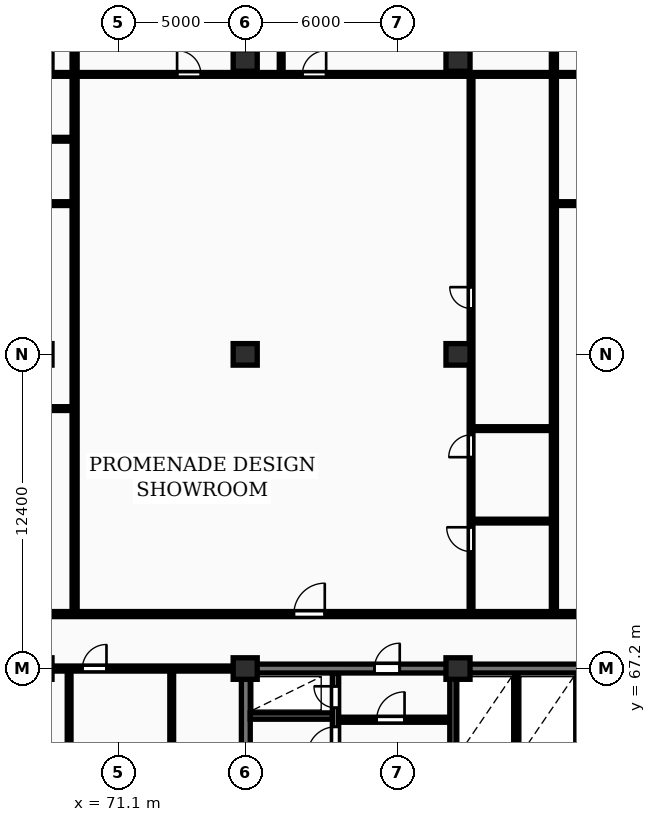
"""IFC4 building model, lengths in metres.
Left out: names, types, materials, properties, quantities, classifications, styles, units other than length and angle.
Written with IfcOpenShell. Run it as: python <this file> out.ifc"""

import sys

from ifc_helpers import new_model, si_unit, direction, frame, frame_2d, origin, origin_2d, place, context, subcontext, project, spatial, rectangle, extrude, element, fill, save


model = new_model("IFC4")
c1 = context("Model", 3, precision=1e-05, world=origin(), true_north=direction((0.0, 1.0)))
c2 = subcontext(c1, "Body", "Model", "MODEL_VIEW")
j1 = project(units=[si_unit("LENGTHUNIT", "METRE"), si_unit("PLANEANGLEUNIT", "RADIAN")], contexts=[c1])
p1 = place(None, origin())
s1 = spatial("IfcSite", under=j1, at=p1, CompositionType="ELEMENT")
p2 = place(p1, origin())
s2 = spatial("IfcBuilding", under=s1, at=p2, CompositionType="ELEMENT")
p3 = place(p2, frame((0.0, 0.0, 80.8)))
s3 = spatial("IfcBuildingStorey", under=s2, at=p3, CompositionType="ELEMENT", Elevation=80.8)
for number, where, z_axis, x_axis in (
    (1, (76.1, 67.2, 0.0), (0.0, 0.0, 1.0), (1.0, 0.0, 0.0)),
    (2, (76.1, 79.6, 0.0), (0.0, 0.0, 1.0), (1.0, 0.0, 0.0)),
    (3, (76.1, 91.2, 0.0), (0.0, 0.0, 1.0), (1.0, 0.0, 0.0)),
    (4, (84.5, 67.2, 0.0), (0.0, 0.0, 1.0), (1.0, 0.0, 0.0)),
    (5, (84.5, 79.6, 0.0), (0.0, 0.0, 1.0), (1.0, 0.0, 0.0)),
    (6, (84.5, 91.2, 0.0), (0.0, 0.0, 1.0), (1.0, 0.0, 0.0)),
):
    element("IfcColumn", number, at=place(p3, frame(where, z_axis=z_axis, x_axis=x_axis)), inside=s3, PredefinedType="COLUMN", context=c2, shape_type="SweptSolid", body=[
        extrude(rectangle(XDim=0.95, YDim=0.85, at=origin_2d()), origin(), (0.0, 0.0, 1.0), 3.25),
    ])
p4 = place(p3, frame((76.125, 55.375, 0.0), z_axis=(0.0, 0.0, 1.0), x_axis=(0.0, 1.0, 0.0)))
e7 = element("IfcWall", 7, at=p4, inside=s3, PredefinedType="SHEAR", context=c2, shape_type="SweptSolid", body=[
    extrude(rectangle(XDim=11.65, YDim=0.35, at=frame_2d((5.825, 0.0))), origin(), (0.0, 0.0, 1.0), 3.25),
])
p5 = place(p3, frame((75.95, 67.2, 0.0), z_axis=(0.0, 0.0, 1.0), x_axis=(1.0, 0.0, 0.0)))
e8 = element("IfcWall", 8, at=p5, inside=s3, PredefinedType="SHEAR", context=c2, shape_type="SweptSolid", body=[
    extrude(rectangle(XDim=36.3, YDim=0.35, at=frame_2d((18.15, 0.0))), origin(), (0.0, 0.0, 1.0), 3.25),
])
p6 = place(p5, frame((5.25, 0.0, 0.0)))
e9 = element("IfcOpeningElement", 9, at=p6, cuts=e8, PredefinedType="OPENING", context=c2, shape_type="SweptSolid", body=[
    extrude(rectangle(XDim=1.0, YDim=2.15, at=frame_2d((0.5, 1.075))), frame((0.0, 0.185, 0.0), z_axis=(0.0, -1.0, 0.0), x_axis=(1.0, 0.0, 0.0)), (0.0, 0.0, 1.0), 0.37),
])
p7 = place(p5, frame((21.6, 0.0, 0.0)))
e10 = element("IfcOpeningElement", 10, at=p7, cuts=e8, PredefinedType="OPENING", context=c2, shape_type="SweptSolid", body=[
    extrude(rectangle(XDim=1.5, YDim=2.2, at=frame_2d((0.75, 1.1))), frame((0.0, 0.185, 0.0), z_axis=(0.0, -1.0, 0.0), x_axis=(1.0, 0.0, 0.0)), (0.0, 0.0, 1.0), 0.37),
])
p8 = place(p5, frame((30.45, 0.0, 0.0)))
e11 = element("IfcOpeningElement", 11, at=p8, cuts=e8, PredefinedType="OPENING", context=c2, shape_type="SweptSolid", body=[
    extrude(rectangle(XDim=1.0, YDim=2.15, at=frame_2d((0.5, 1.075))), frame((0.0, 0.185, 0.0), z_axis=(0.0, -1.0, 0.0), x_axis=(1.0, 0.0, 0.0)), (0.0, 0.0, 1.0), 0.37),
])
p9 = place(p3, frame((79.665, 55.4, 0.0), z_axis=(0.0, 0.0, 1.0), x_axis=(0.0, 1.0, 0.0)))
e12 = element("IfcWall", 12, at=p9, inside=s3, PredefinedType="SHEAR", context=c2, shape_type="SweptSolid", body=[
    extrude(rectangle(XDim=11.6, YDim=0.25, at=frame_2d((5.8, 0.0))), origin(), (0.0, 0.0, 1.0), 3.25),
])
p10 = place(p9, frame((0.55, 0.0, 0.0)))
e13 = element("IfcOpeningElement", 13, at=p10, cuts=e12, PredefinedType="OPENING", context=c2, shape_type="SweptSolid", body=[
    extrude(rectangle(XDim=0.85, YDim=2.05, at=frame_2d((0.425, 1.025))), frame((0.0, 0.135, 0.0), z_axis=(0.0, -1.0, 0.0), x_axis=(1.0, 0.0, 0.0)), (0.0, 0.0, 1.0), 0.27),
])
p11 = place(p9, frame((8.4, 0.0, 0.0)))
e14 = element("IfcOpeningElement", 14, at=p11, cuts=e12, PredefinedType="OPENING", context=c2, shape_type="SweptSolid", body=[
    extrude(rectangle(XDim=1.1, YDim=2.1, at=frame_2d((0.55, 1.05))), frame((0.0, 0.135, 0.0), z_axis=(0.0, -1.0, 0.0), x_axis=(1.0, 0.0, 0.0)), (0.0, 0.0, 1.0), 0.27),
])
p12 = place(p9, frame((10.25, 0.0, 0.0)))
e15 = element("IfcOpeningElement", 15, at=p12, cuts=e12, PredefinedType="OPENING", context=c2, shape_type="SweptSolid", body=[
    extrude(rectangle(XDim=0.85, YDim=2.05, at=frame_2d((0.425, 1.025))), frame((0.0, 0.135, 0.0), z_axis=(0.0, -1.0, 0.0), x_axis=(1.0, 0.0, 0.0)), (0.0, 0.0, 1.0), 0.27),
])
p13 = place(p3, frame((76.3, 65.325, 0.0), z_axis=(0.0, 0.0, 1.0), x_axis=(1.0, 0.0, 0.0)))
e16 = element("IfcWall", 16, at=p13, inside=s3, PredefinedType="SHEAR", context=c2, shape_type="SweptSolid", body=[
    extrude(rectangle(XDim=3.24, YDim=0.25, at=frame_2d((1.62, 0.0))), origin(), (0.0, 0.0, 1.0), 3.25),
])
p14 = place(p3, frame((79.79, 65.18, 0.0), z_axis=(0.0, 0.0, 1.0), x_axis=(1.0, 0.0, 0.0)))
e17 = element("IfcWall", 17, at=p14, inside=s3, PredefinedType="PARTITIONING", context=c2, shape_type="SweptSolid", body=[
    extrude(rectangle(XDim=4.39, YDim=0.2, at=frame_2d((2.195, 0.0))), origin(), (0.0, 0.0, 1.0), 2.97),
])
p15 = place(p14, frame((1.5, 0.0, 0.0)))
e18 = element("IfcOpeningElement", 18, at=p15, cuts=e17, PredefinedType="OPENING", context=c2, shape_type="SweptSolid", body=[
    extrude(rectangle(XDim=1.1, YDim=2.1, at=frame_2d((0.55, 1.05))), frame((0.0, 0.11, 0.0), z_axis=(0.0, -1.0, 0.0), x_axis=(1.0, 0.0, 0.0)), (0.0, 0.0, 1.0), 0.22),
])
p16 = place(p3, frame((84.3, 55.4, 0.0), z_axis=(0.0, 0.0, 1.0), x_axis=(0.0, 1.0, 0.0)))
e19 = element("IfcWall", 19, at=p16, inside=s3, PredefinedType="SHEAR", context=c2, shape_type="SweptSolid", body=[
    extrude(rectangle(XDim=11.6, YDim=0.25, at=frame_2d((5.8, 0.0))), origin(), (0.0, 0.0, 1.0), 3.25),
])
p17 = place(p16, frame((5.2, 0.0, 0.0)))
e20 = element("IfcOpeningElement", 20, at=p17, cuts=e19, PredefinedType="OPENING", context=c2, shape_type="SweptSolid", body=[
    extrude(rectangle(XDim=1.1, YDim=2.1, at=frame_2d((0.55, 1.05))), frame((0.0, 0.135, 0.0), z_axis=(0.0, -1.0, 0.0), x_axis=(1.0, 0.0, 0.0)), (0.0, 0.0, 1.0), 0.27),
])
p18 = place(p3, frame((86.8, 63.4, 0.0), z_axis=(0.0, 0.0, 1.0), x_axis=(0.0, 1.0, 0.0)))
e21 = element("IfcWall", 21, at=p18, inside=s3, PredefinedType="PARTITIONING", context=c2, shape_type="SweptSolid", body=[
    extrude(rectangle(XDim=3.6, YDim=0.15, at=frame_2d((1.8, 0.0))), origin(), (0.0, 0.0, 1.0), 2.97),
])
p19 = place(p3, frame((69.15, 51.1, 0.0), z_axis=(0.0, 0.0, 1.0), x_axis=(0.0, 1.0, 0.0)))
e22 = element("IfcWall", 22, at=p19, inside=s3, PredefinedType="PARTITIONING", context=c2, shape_type="SweptSolid", body=[
    extrude(rectangle(XDim=16.05, YDim=0.15, at=frame_2d((8.025, 0.0))), origin(), (0.0, 0.0, 1.0), 2.97),
])
p20 = place(p19, frame((11.3, 0.0, 0.0)))
e23 = element("IfcOpeningElement", 23, at=p20, cuts=e22, PredefinedType="OPENING", context=c2, shape_type="SweptSolid", body=[
    extrude(rectangle(XDim=0.88, YDim=2.06, at=frame_2d((0.44, 1.03))), frame((0.0, 0.085, 0.0), z_axis=(0.0, -1.0, 0.0), x_axis=(1.0, 0.0, 0.0)), (0.0, 0.0, 1.0), 0.17),
])
p21 = place(p3, frame((73.2, 56.07, 0.0), z_axis=(0.0, 0.0, 1.0), x_axis=(0.0, 1.0, 0.0)))
e24 = element("IfcWall", 24, at=p21, inside=s3, PredefinedType="PARTITIONING", context=c2, shape_type="SweptSolid", body=[
    extrude(rectangle(XDim=11.08, YDim=0.15, at=frame_2d((5.54, 0.0))), origin(), (0.0, 0.0, 1.0), 2.97),
])
p22 = place(p21, frame((5.08, 0.0, 0.0)))
e25 = element("IfcOpeningElement", 25, at=p22, cuts=e24, PredefinedType="OPENING", context=c2, shape_type="SweptSolid", body=[
    extrude(rectangle(XDim=0.92, YDim=2.08, at=frame_2d((0.46, 1.04))), frame((0.0, 0.085, 0.0), z_axis=(0.0, -1.0, 0.0), x_axis=(1.0, 0.0, 0.0)), (0.0, 0.0, 1.0), 0.17),
])
p23 = place(p3, frame((57.6, 67.2, 0.0), z_axis=(0.0, 0.0, 1.0), x_axis=(1.0, 0.0, 0.0)))
e26 = element("IfcWall", 26, at=p23, inside=s3, PredefinedType="PARTITIONING", context=c2, shape_type="SweptSolid", body=[
    extrude(rectangle(XDim=18.35, YDim=0.2, at=frame_2d((9.175, 0.0))), origin(), (0.0, 0.0, 1.0), 2.433),
])
p24 = place(p23, frame((12.075, 0.0, 0.0)))
e27 = element("IfcOpeningElement", 27, at=p24, cuts=e26, PredefinedType="OPENING", context=c2, shape_type="SweptSolid", body=[
    extrude(rectangle(XDim=0.95, YDim=2.15, at=frame_2d((0.475, 1.075))), frame((0.0, 0.11, 0.0), z_axis=(0.0, -1.0, 0.0), x_axis=(1.0, 0.0, 0.0)), (0.0, 0.0, 1.0), 0.22),
])
p25 = place(p3, frame((69.367, 69.43, 0.0), z_axis=(0.0, 0.0, 1.0), x_axis=(0.0, 1.0, 0.0)))
e28 = element("IfcWall", 28, at=p25, inside=s3, PredefinedType="PARTITIONING", context=c2, shape_type="SweptSolid", body=[
    extrude(rectangle(XDim=26.47, YDim=0.2, at=frame_2d((13.235, 0.0))), origin(), (0.0, 0.0, 1.0), 2.97),
])
p26 = place(p3, frame((61.63, 77.46, 0.0), z_axis=(0.0, 0.0, 1.0), x_axis=(1.0, 0.0, 0.0)))
e29 = element("IfcWall", 29, at=p26, inside=s3, PredefinedType="PARTITIONING", context=c2, shape_type="SweptSolid", body=[
    extrude(rectangle(XDim=7.657, YDim=0.15, at=frame_2d((3.828, 0.0))), origin(), (0.0, 0.0, 1.0), 2.97),
])
p27 = place(p26, frame((3.388, 0.0, 0.0)))
e30 = element("IfcOpeningElement", 30, at=p27, cuts=e29, PredefinedType="OPENING", context=c2, shape_type="SweptSolid", body=[
    extrude(rectangle(XDim=0.88, YDim=2.06, at=frame_2d((0.44, 1.03))), frame((0.0, 0.085, 0.0), z_axis=(0.0, -1.0, 0.0), x_axis=(1.0, 0.0, 0.0)), (0.0, 0.0, 1.0), 0.17),
])
p28 = place(p3, frame((66.007, 88.09, 0.0), z_axis=(0.0, 0.0, 1.0), x_axis=(1.0, 0.0, 0.0)))
e31 = element("IfcWall", 31, at=p28, inside=s3, PredefinedType="PARTITIONING", context=c2, shape_type="SweptSolid", body=[
    extrude(rectangle(XDim=3.28, YDim=0.15, at=frame_2d((1.64, 0.0))), origin(), (0.0, 0.0, 1.0), 2.97),
])
p29 = place(p3, frame((57.68, 85.55, 0.0), z_axis=(0.0, 0.0, 1.0), x_axis=(1.0, 0.0, 0.0)))
e32 = element("IfcWall", 32, at=p29, inside=s3, PredefinedType="PARTITIONING", context=c2, shape_type="SweptSolid", body=[
    extrude(rectangle(XDim=11.607, YDim=0.15, at=frame_2d((5.803, 0.0))), origin(), (0.0, 0.0, 1.0), 2.97),
])
p30 = place(p29, frame((2.72, 0.0, 0.0)))
e33 = element("IfcOpeningElement", 33, at=p30, cuts=e32, PredefinedType="OPENING", context=c2, shape_type="SweptSolid", body=[
    extrude(rectangle(XDim=0.92, YDim=2.08, at=frame_2d((0.46, 1.04))), frame((0.0, 0.085, 0.0), z_axis=(0.0, -1.0, 0.0), x_axis=(1.0, 0.0, 0.0)), (0.0, 0.0, 1.0), 0.17),
])
p31 = place(p3, frame((57.68, 90.65, 0.0), z_axis=(0.0, 0.0, 1.0), x_axis=(1.0, 0.0, 0.0)))
e34 = element("IfcWall", 34, at=p31, inside=s3, PredefinedType="PARTITIONING", context=c2, shape_type="SweptSolid", body=[
    extrude(rectangle(XDim=11.607, YDim=0.15, at=frame_2d((5.803, 0.0))), origin(), (0.0, 0.0, 1.0), 2.97),
])
p32 = place(p31, frame((5.333, 0.0, 0.0)))
e35 = element("IfcOpeningElement", 35, at=p32, cuts=e34, PredefinedType="OPENING", context=c2, shape_type="SweptSolid", body=[
    extrude(rectangle(XDim=0.94, YDim=2.1, at=frame_2d((0.47, 1.05))), frame((0.0, 0.085, 0.0), z_axis=(0.0, -1.0, 0.0), x_axis=(1.0, 0.0, 0.0)), (0.0, 0.0, 1.0), 0.17),
])
p33 = place(p3, frame((88.285, 69.43, 0.0), z_axis=(0.0, 0.0, 1.0), x_axis=(0.0, 1.0, 0.0)))
e36 = element("IfcWall", 36, at=p33, inside=s3, PredefinedType="PARTITIONING", context=c2, shape_type="SweptSolid", body=[
    extrude(rectangle(XDim=26.47, YDim=0.2, at=frame_2d((13.235, 0.0))), origin(), (0.0, 0.0, 1.0), 2.97),
])
for number, where, z_axis, x_axis in (
    (37, (85.075, 73.02, 0.0), (0.0, 0.0, 1.0), (1.0, 0.0, 0.0)),
    (38, (85.075, 76.67, 0.0), (0.0, 0.0, 1.0), (1.0, 0.0, 0.0)),
):
    element("IfcWall", number, at=place(p3, frame(where, z_axis=z_axis, x_axis=x_axis)), inside=s3, PredefinedType="PARTITIONING", context=c2, shape_type="SweptSolid", body=[
        extrude(rectangle(XDim=3.13, YDim=0.15, at=frame_2d((1.565, 0.0))), origin(), (0.0, 0.0, 1.0), 2.97),
    ])
p34 = place(p3, frame((85.015, 69.41, 0.0), z_axis=(0.0, 0.0, 1.0), x_axis=(0.0, 1.0, 0.0)))
e39 = element("IfcWall", 39, at=p34, inside=s3, PredefinedType="PARTITIONING", context=c2, shape_type="SweptSolid", body=[
    extrude(rectangle(XDim=21.18, YDim=0.15, at=frame_2d((10.59, 0.0))), origin(), (0.0, 0.0, 1.0), 2.97),
])
p35 = place(p34, frame((2.406, 0.0, 0.0)))
e40 = element("IfcOpeningElement", 40, at=p35, cuts=e39, PredefinedType="OPENING", context=c2, shape_type="SweptSolid", body=[
    extrude(rectangle(XDim=0.96, YDim=2.1, at=frame_2d((0.48, 1.05))), frame((0.0, 0.085, 0.0), z_axis=(0.0, -1.0, 0.0), x_axis=(1.0, 0.0, 0.0)), (0.0, 0.0, 1.0), 0.17),
])
p36 = place(p34, frame((6.133, 0.0, 0.0)))
e41 = element("IfcOpeningElement", 41, at=p36, cuts=e39, PredefinedType="OPENING", context=c2, shape_type="SweptSolid", body=[
    extrude(rectangle(XDim=0.88, YDim=2.06, at=frame_2d((0.44, 1.03))), frame((0.0, 0.085, 0.0), z_axis=(0.0, -1.0, 0.0), x_axis=(1.0, 0.0, 0.0)), (0.0, 0.0, 1.0), 0.17),
])
p37 = place(p34, frame((12.003, 0.0, 0.0)))
e42 = element("IfcOpeningElement", 42, at=p37, cuts=e39, PredefinedType="OPENING", context=c2, shape_type="SweptSolid", body=[
    extrude(rectangle(XDim=0.84, YDim=2.04, at=frame_2d((0.42, 1.02))), frame((0.0, 0.085, 0.0), z_axis=(0.0, -1.0, 0.0), x_axis=(1.0, 0.0, 0.0)), (0.0, 0.0, 1.0), 0.17),
])
p38 = place(p3, frame((77.521, 90.73, 0.0), z_axis=(0.0, 0.0, 1.0), x_axis=(0.0, 1.0, 0.0)))
e43 = element("IfcWall", 43, at=p38, inside=s3, PredefinedType="PARTITIONING", context=c2, shape_type="SweptSolid", body=[
    extrude(rectangle(XDim=5.17, YDim=0.15, at=frame_2d((2.585, 0.0))), origin(), (0.0, 0.0, 1.0), 2.97),
])
p39 = place(p3, frame((69.447, 90.65, 0.0), z_axis=(0.0, 0.0, 1.0), x_axis=(1.0, 0.0, 0.0)))
e44 = element("IfcWall", 44, at=p39, inside=s3, PredefinedType="PARTITIONING", context=c2, shape_type="SweptSolid", body=[
    extrude(rectangle(XDim=18.758, YDim=0.15, at=frame_2d((9.379, 0.0))), origin(), (0.0, 0.0, 1.0), 2.97),
])
p40 = place(p39, frame((3.965, 0.0, 0.0)))
e45 = element("IfcOpeningElement", 45, at=p40, cuts=e44, PredefinedType="OPENING", context=c2, shape_type="SweptSolid", body=[
    extrude(rectangle(XDim=0.94, YDim=2.1, at=frame_2d((0.47, 1.05))), frame((0.0, 0.085, 0.0), z_axis=(0.0, -1.0, 0.0), x_axis=(1.0, 0.0, 0.0)), (0.0, 0.0, 1.0), 0.17),
])
p41 = place(p39, frame((8.909, 0.0, 0.0)))
e46 = element("IfcOpeningElement", 46, at=p41, cuts=e44, PredefinedType="OPENING", context=c2, shape_type="SweptSolid", body=[
    extrude(rectangle(XDim=0.94, YDim=2.1, at=frame_2d((0.47, 1.05))), frame((0.0, 0.085, 0.0), z_axis=(0.0, -1.0, 0.0), x_axis=(1.0, 0.0, 0.0)), (0.0, 0.0, 1.0), 0.17),
])
p42 = place(p3, frame((88.365, 85.55, 0.0), z_axis=(0.0, 0.0, 1.0), x_axis=(1.0, 0.0, 0.0)))
e47 = element("IfcWall", 47, at=p42, inside=s3, PredefinedType="PARTITIONING", context=c2, shape_type="SweptSolid", body=[
    extrude(rectangle(XDim=12.543, YDim=0.15, at=frame_2d((6.271, 0.0))), origin(), (0.0, 0.0, 1.0), 2.97),
])
p43 = place(p42, frame((2.72, 0.0, 0.0)))
e48 = element("IfcOpeningElement", 48, at=p43, cuts=e47, PredefinedType="OPENING", context=c2, shape_type="SweptSolid", body=[
    extrude(rectangle(XDim=0.92, YDim=2.08, at=frame_2d((0.46, 1.04))), frame((0.0, 0.085, 0.0), z_axis=(0.0, -1.0, 0.0), x_axis=(1.0, 0.0, 0.0)), (0.0, 0.0, 1.0), 0.17),
])
p44 = place(p3, frame((88.365, 90.65, 0.0), z_axis=(0.0, 0.0, 1.0), x_axis=(1.0, 0.0, 0.0)))
e49 = element("IfcWall", 49, at=p44, inside=s3, PredefinedType="PARTITIONING", context=c2, shape_type="SweptSolid", body=[
    extrude(rectangle(XDim=12.543, YDim=0.15, at=frame_2d((6.271, 0.0))), origin(), (0.0, 0.0, 1.0), 2.97),
])
p45 = place(p44, frame((7.081, 0.0, 0.0)))
e50 = element("IfcOpeningElement", 50, at=p45, cuts=e49, PredefinedType="OPENING", context=c2, shape_type="SweptSolid", body=[
    extrude(rectangle(XDim=0.94, YDim=2.1, at=frame_2d((0.47, 1.05))), frame((0.0, 0.085, 0.0), z_axis=(0.0, -1.0, 0.0), x_axis=(1.0, 0.0, 0.0)), (0.0, 0.0, 1.0), 0.17),
])
p46 = place(p3, frame((57.6, 69.35, 0.0), z_axis=(0.0, 0.0, 1.0), x_axis=(1.0, 0.0, 0.0)))
e51 = element("IfcWall", 51, at=p46, inside=s3, PredefinedType="PARTITIONING", context=c2, shape_type="SweptSolid", body=[
    extrude(rectangle(XDim=73.0, YDim=0.2, at=frame_2d((36.5, 0.0))), origin(), (0.0, 0.0, 1.0), 2.97),
])
p47 = place(p46, frame((0.37, 0.0, 0.0)))
e52 = element("IfcOpeningElement", 52, at=p47, cuts=e51, PredefinedType="OPENING", context=c2, shape_type="SweptSolid", body=[
    extrude(rectangle(XDim=0.95, YDim=2.15, at=frame_2d((0.475, 1.075))), frame((0.0, 0.11, 0.0), z_axis=(0.0, -1.0, 0.0), x_axis=(1.0, 0.0, 0.0)), (0.0, 0.0, 1.0), 0.22),
])
p48 = place(p46, frame((20.421, 0.0, 0.0)))
e53 = element("IfcOpeningElement", 53, at=p48, cuts=e51, PredefinedType="OPENING", context=c2, shape_type="SweptSolid", body=[
    extrude(rectangle(XDim=1.22, YDim=2.18, at=frame_2d((0.61, 1.09))), frame((0.0, 0.11, 0.0), z_axis=(0.0, -1.0, 0.0), x_axis=(1.0, 0.0, 0.0)), (0.0, 0.0, 1.0), 0.22),
])
p49 = place(p46, frame((32.729, 0.0, 0.0)))
e54 = element("IfcOpeningElement", 54, at=p49, cuts=e51, PredefinedType="OPENING", context=c2, shape_type="SweptSolid", body=[
    extrude(rectangle(XDim=0.95, YDim=2.15, at=frame_2d((0.475, 1.075))), frame((0.0, 0.11, 0.0), z_axis=(0.0, -1.0, 0.0), x_axis=(1.0, 0.0, 0.0)), (0.0, 0.0, 1.0), 0.22),
])
p50 = place(p46, frame((46.157, 0.0, 0.0)))
e55 = element("IfcOpeningElement", 55, at=p50, cuts=e51, PredefinedType="OPENING", context=c2, shape_type="SweptSolid", body=[
    extrude(rectangle(XDim=0.95, YDim=2.15, at=frame_2d((0.475, 1.075))), frame((0.0, 0.11, 0.0), z_axis=(0.0, -1.0, 0.0), x_axis=(1.0, 0.0, 0.0)), (0.0, 0.0, 1.0), 0.22),
])
p51 = place(p46, frame((60.803, 0.0, 0.0)))
e56 = element("IfcOpeningElement", 56, at=p51, cuts=e51, PredefinedType="OPENING", context=c2, shape_type="SweptSolid", body=[
    extrude(rectangle(XDim=0.95, YDim=2.15, at=frame_2d((0.475, 1.075))), frame((0.0, 0.11, 0.0), z_axis=(0.0, -1.0, 0.0), x_axis=(1.0, 0.0, 0.0)), (0.0, 0.0, 1.0), 0.22),
])
p52 = place(p6, origin())
e57 = element("IfcDoor", 57, at=p52, inside=s3, OperationType="SINGLE_SWING_RIGHT", PredefinedType="DOOR", context=c2, shape_type="SweptSolid", body=[
    extrude(rectangle(XDim=1.0, YDim=2.15, at=frame_2d((0.5, 1.075))), frame((0.0, 0.025, 0.0), z_axis=(0.0, -1.0, 0.0), x_axis=(1.0, 0.0, 0.0)), (0.0, 0.0, 1.0), 0.05),
])
fill(e9, e57)
p53 = place(p11, origin())
e58 = element("IfcDoor", 58, at=p53, inside=s3, OperationType="SINGLE_SWING_LEFT", PredefinedType="DOOR", context=c2, shape_type="SweptSolid", body=[
    extrude(rectangle(XDim=1.1, YDim=2.1, at=frame_2d((0.55, 1.05))), frame((0.0, 0.025, 0.0), z_axis=(0.0, -1.0, 0.0), x_axis=(1.0, 0.0, 0.0)), (0.0, 0.0, 1.0), 0.05),
])
fill(e14, e58)
p54 = place(p12, origin())
e59 = element("IfcDoor", 59, at=p54, inside=s3, OperationType="SINGLE_SWING_RIGHT", PredefinedType="DOOR", context=c2, shape_type="SweptSolid", body=[
    extrude(rectangle(XDim=0.85, YDim=2.05, at=frame_2d((0.425, 1.025))), frame((0.0, 0.025, 0.0), z_axis=(0.0, -1.0, 0.0), x_axis=(1.0, 0.0, 0.0)), (0.0, 0.0, 1.0), 0.05),
])
fill(e15, e59)
p55 = place(p15, origin())
e60 = element("IfcDoor", 60, at=p55, inside=s3, OperationType="SINGLE_SWING_RIGHT", PredefinedType="DOOR", context=c2, shape_type="SweptSolid", body=[
    extrude(rectangle(XDim=1.1, YDim=2.1, at=frame_2d((0.55, 1.05))), frame((0.0, 0.025, 0.0), z_axis=(0.0, -1.0, 0.0), x_axis=(1.0, 0.0, 0.0)), (0.0, 0.0, 1.0), 0.05),
])
fill(e18, e60)
p56 = place(p24, origin())
e61 = element("IfcDoor", 61, at=p56, inside=s3, OperationType="SINGLE_SWING_RIGHT", PredefinedType="DOOR", context=c2, shape_type="SweptSolid", body=[
    extrude(rectangle(XDim=0.95, YDim=2.15, at=frame_2d((0.475, 1.075))), frame((0.0, 0.025, 0.0), z_axis=(0.0, -1.0, 0.0), x_axis=(1.0, 0.0, 0.0)), (0.0, 0.0, 1.0), 0.05),
])
fill(e27, e61)
p57 = place(p35, origin())
e62 = element("IfcDoor", 62, at=p57, inside=s3, OperationType="SINGLE_SWING_RIGHT", PredefinedType="DOOR", context=c2, shape_type="SweptSolid", body=[
    extrude(rectangle(XDim=0.96, YDim=2.1, at=frame_2d((0.48, 1.05))), frame((0.0, 0.025, 0.0), z_axis=(0.0, -1.0, 0.0), x_axis=(1.0, 0.0, 0.0)), (0.0, 0.0, 1.0), 0.05),
])
fill(e40, e62)
p58 = place(p36, origin())
e63 = element("IfcDoor", 63, at=p58, inside=s3, OperationType="SINGLE_SWING_LEFT", PredefinedType="DOOR", context=c2, shape_type="SweptSolid", body=[
    extrude(rectangle(XDim=0.88, YDim=2.06, at=frame_2d((0.44, 1.03))), frame((0.0, 0.025, 0.0), z_axis=(0.0, -1.0, 0.0), x_axis=(1.0, 0.0, 0.0)), (0.0, 0.0, 1.0), 0.05),
])
fill(e41, e63)
p59 = place(p37, origin())
e64 = element("IfcDoor", 64, at=p59, inside=s3, OperationType="SINGLE_SWING_RIGHT", PredefinedType="DOOR", context=c2, shape_type="SweptSolid", body=[
    extrude(rectangle(XDim=0.84, YDim=2.04, at=frame_2d((0.42, 1.02))), frame((0.0, 0.025, 0.0), z_axis=(0.0, -1.0, 0.0), x_axis=(1.0, 0.0, 0.0)), (0.0, 0.0, 1.0), 0.05),
])
fill(e42, e64)
p60 = place(p40, origin())
e65 = element("IfcDoor", 65, at=p60, inside=s3, OperationType="SINGLE_SWING_LEFT", PredefinedType="DOOR", context=c2, shape_type="SweptSolid", body=[
    extrude(rectangle(XDim=0.94, YDim=2.1, at=frame_2d((0.47, 1.05))), frame((0.0, 0.025, 0.0), z_axis=(0.0, -1.0, 0.0), x_axis=(1.0, 0.0, 0.0)), (0.0, 0.0, 1.0), 0.05),
])
fill(e45, e65)
p61 = place(p41, origin())
e66 = element("IfcDoor", 66, at=p61, inside=s3, OperationType="SINGLE_SWING_RIGHT", PredefinedType="DOOR", context=c2, shape_type="SweptSolid", body=[
    extrude(rectangle(XDim=0.94, YDim=2.1, at=frame_2d((0.47, 1.05))), frame((0.0, 0.025, 0.0), z_axis=(0.0, -1.0, 0.0), x_axis=(1.0, 0.0, 0.0)), (0.0, 0.0, 1.0), 0.05),
])
fill(e46, e66)
p62 = place(p48, origin())
e67 = element("IfcDoor", 67, at=p62, inside=s3, OperationType="SINGLE_SWING_RIGHT", PredefinedType="DOOR", context=c2, shape_type="SweptSolid", body=[
    extrude(rectangle(XDim=1.22, YDim=2.18, at=frame_2d((0.61, 1.09))), frame((0.0, 0.025, 0.0), z_axis=(0.0, -1.0, 0.0), x_axis=(1.0, 0.0, 0.0)), (0.0, 0.0, 1.0), 0.05),
])
fill(e53, e67)
save(model, sys.argv[1])
